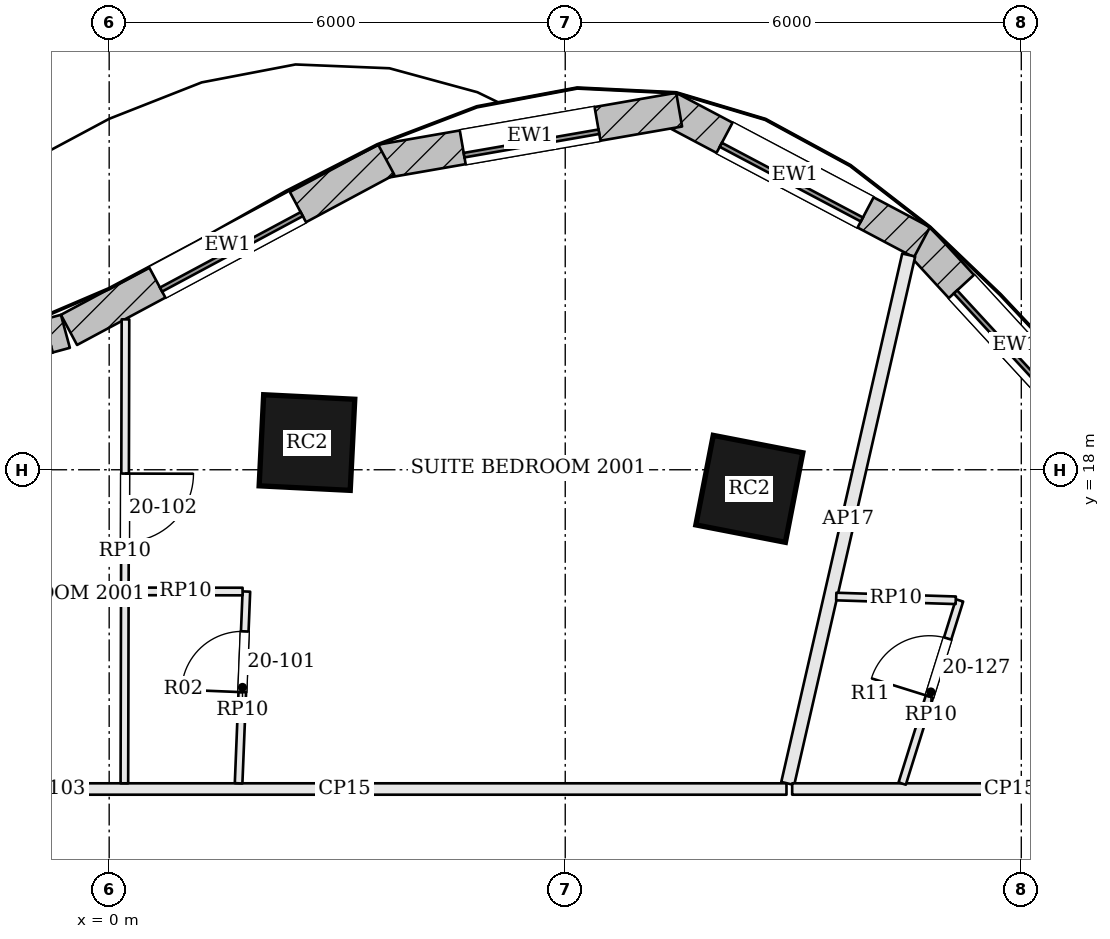
"""IFC4 building model, lengths in metres.
Left out: names, types, materials, properties, quantities, classifications, styles, units other than length and angle.
Written with IfcOpenShell. Run it as: python <this file> out.ifc"""

import sys

from ifc_helpers import new_model, si_unit, direction, frame, frame_2d, origin, origin_2d, place, context, subcontext, project, spatial, rectangle, extrude, element, fill, save


model = new_model("IFC4")
c1 = context("Model", 3, precision=1e-05, world=origin(), true_north=direction((0.0, 1.0)))
c2 = subcontext(c1, "Body", "Model", "MODEL_VIEW")
j1 = project(units=[si_unit("LENGTHUNIT", "METRE"), si_unit("PLANEANGLEUNIT", "RADIAN")], contexts=[c1])
p1 = place(None, origin())
s1 = spatial("IfcSite", under=j1, at=p1, CompositionType="ELEMENT")
p2 = place(p1, origin())
s2 = spatial("IfcBuilding", under=s1, at=p2, CompositionType="ELEMENT")
p3 = place(p2, frame((0.0, 0.0, 88.8)))
s3 = spatial("IfcBuildingStorey", under=s2, at=p3, CompositionType="ELEMENT", Elevation=88.8)
for number, where, z_axis, x_axis in (
    (1, (8.422, 17.749, 0.0), (0.0, 0.0, 1.0), (-0.982, 0.191, 0.0)),
    (2, (2.602, 18.358, 0.0), (0.0, 0.0, 1.0), (-0.999, 0.05, 0.0)),
):
    element("IfcColumn", number, at=place(p3, frame(where, z_axis=z_axis, x_axis=x_axis)), inside=s3, PredefinedType="COLUMN", context=c2, shape_type="SweptSolid", body=[
        extrude(rectangle(XDim=1.2, YDim=1.2, at=origin_2d()), origin(), (0.0, 0.0, 1.0), 3.6),
    ])
p4 = place(p3, frame((13.209, 18.243, 0.0), z_axis=(0.0, 0.0, 1.0), x_axis=(-0.677612152497, 0.735419452278, 0.0)))
e3 = element("IfcWall", 3, at=p4, inside=s3, PredefinedType="SOLIDWALL", context=c2, shape_type="SweptSolid", body=[
    extrude(rectangle(XDim=3.797, YDim=0.45, at=frame_2d((1.898, 0.0))), origin(), (0.0, 0.0, 1.0), 3.4),
])
p5 = place(p4, frame((0.848, 0.0, 0.9)))
e4 = element("IfcOpeningElement", 4, at=p5, cuts=e3, PredefinedType="OPENING", context=c2, shape_type="SweptSolid", body=[
    extrude(rectangle(XDim=2.1, YDim=2.0, at=frame_2d((1.05, 1.0))), frame((0.0, 0.235, 0.0), z_axis=(0.0, -1.0, 0.0), x_axis=(1.0, 0.0, 0.0)), (0.0, 0.0, 1.0), 0.47),
])
p6 = place(p3, frame((10.693, 20.993, 0.0), z_axis=(0.0, 0.0, 1.0), x_axis=(-0.883817790726, 0.46783128668, 0.0)))
e5 = element("IfcWall", 5, at=p6, inside=s3, PredefinedType="SOLIDWALL", context=c2, shape_type="SweptSolid", body=[
    extrude(rectangle(XDim=3.777, YDim=0.45, at=frame_2d((1.888, 0.0))), origin(), (0.0, 0.0, 1.0), 3.4),
])
p7 = place(p6, frame((0.838, 0.0, 0.9)))
e6 = element("IfcOpeningElement", 6, at=p7, cuts=e5, PredefinedType="OPENING", context=c2, shape_type="SweptSolid", body=[
    extrude(rectangle(XDim=2.1, YDim=2.0, at=frame_2d((1.05, 1.0))), frame((0.0, 0.235, 0.0), z_axis=(0.0, -1.0, 0.0), x_axis=(1.0, 0.0, 0.0)), (0.0, 0.0, 1.0), 0.47),
])
p8 = place(p3, frame((7.499, 22.737, 0.0), z_axis=(0.0, 0.0, 1.0), x_axis=(-0.98521220506, -0.171338585849, 0.0)))
e7 = element("IfcWall", 7, at=p8, inside=s3, PredefinedType="SOLIDWALL", context=c2, shape_type="SweptSolid", body=[
    extrude(rectangle(XDim=3.98, YDim=0.45, at=frame_2d((1.99, 0.0))), origin(), (0.0, 0.0, 1.0), 3.4),
])
p9 = place(p8, frame((1.09, 0.0, 0.9)))
e8 = element("IfcOpeningElement", 8, at=p9, cuts=e7, PredefinedType="OPENING", context=c2, shape_type="SweptSolid", body=[
    extrude(rectangle(XDim=1.8, YDim=2.0, at=frame_2d((0.9, 1.0))), frame((0.0, 0.235, 0.0), z_axis=(0.0, -1.0, 0.0), x_axis=(1.0, 0.0, 0.0)), (0.0, 0.0, 1.0), 0.47),
])
p10 = place(p3, frame((3.646, 22.079, 0.0), z_axis=(0.0, 0.0, 1.0), x_axis=(-0.881279133897, -0.472596115259, 0.0)))
e9 = element("IfcWall", 9, at=p10, inside=s3, PredefinedType="SOLIDWALL", context=c2, shape_type="SweptSolid", body=[
    extrude(rectangle(XDim=4.737, YDim=0.45, at=frame_2d((2.368, 0.0))), origin(), (0.0, 0.0, 1.0), 3.4),
])
p11 = place(p10, frame((1.318, 0.0, 0.9)))
e10 = element("IfcOpeningElement", 10, at=p11, cuts=e9, PredefinedType="OPENING", context=c2, shape_type="SweptSolid", body=[
    extrude(rectangle(XDim=2.1, YDim=2.0, at=frame_2d((1.05, 1.0))), frame((0.0, 0.235, 0.0), z_axis=(0.0, -1.0, 0.0), x_axis=(1.0, 0.0, 0.0)), (0.0, 0.0, 1.0), 0.47),
])
p12 = place(p3, frame((-0.576, 19.821, 0.0), z_axis=(0.0, 0.0, 1.0), x_axis=(-0.965009398019, -0.262215296532, 0.0)))
e11 = element("IfcWall", 11, at=p12, inside=s3, PredefinedType="SOLIDWALL", context=c2, shape_type="SweptSolid", body=[
    extrude(rectangle(XDim=2.565, YDim=0.45, at=frame_2d((1.283, 0.0))), origin(), (0.0, 0.0, 1.0), 3.4),
])
p13 = place(p12, frame((0.233, 0.0, 0.9)))
e12 = element("IfcOpeningElement", 12, at=p13, cuts=e11, PredefinedType="OPENING", context=c2, shape_type="SweptSolid", body=[
    extrude(rectangle(XDim=2.1, YDim=2.0, at=frame_2d((1.05, 1.0))), frame((0.0, 0.235, 0.0), z_axis=(0.0, -1.0, 0.0), x_axis=(1.0, 0.0, 0.0)), (0.0, 0.0, 1.0), 0.47),
])
p14 = place(p3, frame((8.911, 13.8, 0.0), z_axis=(0.0, 0.0, 1.0), x_axis=(-1.0, 0.0, 0.0)))
e13 = element("IfcWall", 13, at=p14, inside=s3, PredefinedType="PARTITIONING", context=c2, shape_type="SweptSolid", body=[
    extrude(rectangle(XDim=11.628, YDim=0.15, at=frame_2d((5.814, 0.0))), origin(), (0.0, 0.0, 1.0), 2.784),
])
p15 = place(p14, frame((9.669, 0.0, 0.0)))
e14 = element("IfcOpeningElement", 14, at=p15, cuts=e13, PredefinedType="OPENING", context=c2, shape_type="SweptSolid", body=[
    extrude(rectangle(XDim=1.0, YDim=2.1, at=frame_2d((0.5, 1.05))), frame((0.0, 0.085, 0.0), z_axis=(0.0, -1.0, 0.0), x_axis=(1.0, 0.0, 0.0)), (0.0, 0.0, 1.0), 0.17),
])
p16 = place(p3, frame((10.519, 20.825, 0.0), z_axis=(0.0, 0.0, 1.0), x_axis=(-0.223124088509, -0.974790049768, 0.0)))
e15 = element("IfcWall", 15, at=p16, inside=s3, PredefinedType="PARTITIONING", context=c2, shape_type="SweptSolid", body=[
    extrude(rectangle(XDim=7.132, YDim=0.175, at=frame_2d((3.566, 0.0))), origin(), (0.0, 0.0, 1.0), 2.784),
])
p17 = place(p3, frame((14.725, 13.8, 0.0), z_axis=(0.0, 0.0, 1.0), x_axis=(-1.0, 0.0, 0.0)))
e16 = element("IfcWall", 16, at=p17, inside=s3, PredefinedType="PARTITIONING", context=c2, shape_type="SweptSolid", body=[
    extrude(rectangle(XDim=5.74, YDim=0.15, at=frame_2d((2.87, 0.0))), origin(), (0.0, 0.0, 1.0), 2.784),
])
p18 = place(p3, frame((0.214, 19.979, 0.0), z_axis=(0.0, 0.0, 1.0), x_axis=(-0.002359899032, -0.999997215434, 0.0)))
e17 = element("IfcWall", 17, at=p18, inside=s3, PredefinedType="PARTITIONING", context=c2, shape_type="SweptSolid", body=[
    extrude(rectangle(XDim=6.104, YDim=0.1, at=frame_2d((3.052, 0.0))), origin(), (0.0, 0.0, 1.0), 2.884),
])
p19 = place(p18, frame((2.029, 0.0, 0.0)))
e18 = element("IfcOpeningElement", 18, at=p19, cuts=e17, PredefinedType="OPENING", context=c2, shape_type="SweptSolid", body=[
    extrude(rectangle(XDim=0.9, YDim=2.4, at=frame_2d((0.45, 1.2))), frame((0.0, 0.06, 0.0), z_axis=(0.0, -1.0, 0.0), x_axis=(1.0, 0.0, 0.0)), (0.0, 0.0, 1.0), 0.12),
])
p20 = place(p3, frame((1.703, 13.875, 0.0), z_axis=(0.0, 0.0, 1.0), x_axis=(0.040512484472, 0.999179032307, 0.0)))
e19 = element("IfcWall", 19, at=p20, inside=s3, PredefinedType="PARTITIONING", context=c2, shape_type="SweptSolid", body=[
    extrude(rectangle(XDim=2.525, YDim=0.1, at=frame_2d((1.262, 0.0))), origin(), (0.0, 0.0, 1.0), 2.884),
])
p21 = place(p20, frame((1.2, 0.0, 0.0)))
e20 = element("IfcOpeningElement", 20, at=p21, cuts=e19, PredefinedType="OPENING", context=c2, shape_type="SweptSolid", body=[
    extrude(rectangle(XDim=0.8, YDim=2.1, at=frame_2d((0.4, 1.05))), frame((0.0, 0.06, 0.0), z_axis=(0.0, -1.0, 0.0), x_axis=(1.0, 0.0, 0.0)), (0.0, 0.0, 1.0), 0.12),
])
p22 = place(p3, frame((1.755, 16.398, 0.0), z_axis=(0.0, 0.0, 1.0), x_axis=(-0.999999151462, 0.001302718321, 0.0)))
e21 = element("IfcWall", 21, at=p22, inside=s3, PredefinedType="PARTITIONING", context=c2, shape_type="SweptSolid", body=[
    extrude(rectangle(XDim=1.499, YDim=0.1, at=frame_2d((0.75, 0.0))), origin(), (0.0, 0.0, 1.0), 2.884),
])
p23 = place(p3, frame((10.433, 13.872, 0.0), z_axis=(0.0, 0.0, 1.0), x_axis=(0.298770443437, 0.954325008647, 0.0)))
e22 = element("IfcWall", 22, at=p23, inside=s3, PredefinedType="PARTITIONING", context=c2, shape_type="SweptSolid", body=[
    extrude(rectangle(XDim=2.525, YDim=0.1, at=frame_2d((1.262, 0.0))), origin(), (0.0, 0.0, 1.0), 2.884),
])
p24 = place(p23, frame((1.2, 0.0, 0.0)))
e23 = element("IfcOpeningElement", 23, at=p24, cuts=e22, PredefinedType="OPENING", context=c2, shape_type="SweptSolid", body=[
    extrude(rectangle(XDim=0.8, YDim=2.1, at=frame_2d((0.4, 1.05))), frame((0.0, 0.06, 0.0), z_axis=(0.0, -1.0, 0.0), x_axis=(1.0, 0.0, 0.0)), (0.0, 0.0, 1.0), 0.12),
])
p25 = place(p3, frame((11.138, 16.283, 0.0), z_axis=(0.0, 0.0, 1.0), x_axis=(-0.99950813006, 0.031360770779, 0.0)))
e24 = element("IfcWall", 24, at=p25, inside=s3, PredefinedType="PARTITIONING", context=c2, shape_type="SweptSolid", body=[
    extrude(rectangle(XDim=1.573, YDim=0.1, at=frame_2d((0.786, 0.0))), origin(), (0.0, 0.0, 1.0), 2.884),
])
p26 = place(p5, origin())
e25 = element("IfcWindow", 25, at=p26, inside=s3, PartitioningType="SINGLE_PANEL", PredefinedType="WINDOW", context=c2, shape_type="SweptSolid", body=[
    extrude(rectangle(XDim=2.1, YDim=2.0, at=frame_2d((1.05, 1.0))), frame((0.0, 0.135, 0.0), z_axis=(0.0, -1.0, 0.0), x_axis=(1.0, 0.0, 0.0)), (0.0, 0.0, 1.0), 0.06),
])
fill(e4, e25)
p27 = place(p7, origin())
e26 = element("IfcWindow", 26, at=p27, inside=s3, PartitioningType="SINGLE_PANEL", PredefinedType="WINDOW", context=c2, shape_type="SweptSolid", body=[
    extrude(rectangle(XDim=2.1, YDim=2.0, at=frame_2d((1.05, 1.0))), frame((0.0, 0.135, 0.0), z_axis=(0.0, -1.0, 0.0), x_axis=(1.0, 0.0, 0.0)), (0.0, 0.0, 1.0), 0.06),
])
fill(e6, e26)
p28 = place(p9, origin())
e27 = element("IfcWindow", 27, at=p28, inside=s3, PartitioningType="SINGLE_PANEL", PredefinedType="WINDOW", context=c2, shape_type="SweptSolid", body=[
    extrude(rectangle(XDim=1.8, YDim=2.0, at=frame_2d((0.9, 1.0))), frame((0.0, 0.135, 0.0), z_axis=(0.0, -1.0, 0.0), x_axis=(1.0, 0.0, 0.0)), (0.0, 0.0, 1.0), 0.06),
])
fill(e8, e27)
p29 = place(p11, origin())
e28 = element("IfcWindow", 28, at=p29, inside=s3, PartitioningType="SINGLE_PANEL", PredefinedType="WINDOW", context=c2, shape_type="SweptSolid", body=[
    extrude(rectangle(XDim=2.1, YDim=2.0, at=frame_2d((1.05, 1.0))), frame((0.0, 0.135, 0.0), z_axis=(0.0, -1.0, 0.0), x_axis=(1.0, 0.0, 0.0)), (0.0, 0.0, 1.0), 0.06),
])
fill(e10, e28)
p30 = place(p21, origin())
e29 = element("IfcDoor", 29, at=p30, inside=s3, OperationType="SINGLE_SWING_LEFT", PredefinedType="DOOR", context=c2, shape_type="SweptSolid", body=[
    extrude(rectangle(XDim=0.8, YDim=2.1, at=frame_2d((0.4, 1.05))), frame((0.0, 0.025, 0.0), z_axis=(0.0, -1.0, 0.0), x_axis=(1.0, 0.0, 0.0)), (0.0, 0.0, 1.0), 0.05),
])
fill(e20, e29)
p31 = place(p19, origin())
e30 = element("IfcDoor", 30, at=p31, inside=s3, OperationType="SINGLE_SWING_LEFT", PredefinedType="DOOR", context=c2, shape_type="SweptSolid", body=[
    extrude(rectangle(XDim=0.9, YDim=2.4, at=frame_2d((0.45, 1.2))), frame((0.0, 0.025, 0.0), z_axis=(0.0, -1.0, 0.0), x_axis=(1.0, 0.0, 0.0)), (0.0, 0.0, 1.0), 0.05),
])
fill(e18, e30)
p32 = place(p24, origin())
e31 = element("IfcDoor", 31, at=p32, inside=s3, OperationType="SINGLE_SWING_LEFT", PredefinedType="DOOR", context=c2, shape_type="SweptSolid", body=[
    extrude(rectangle(XDim=0.8, YDim=2.1, at=frame_2d((0.4, 1.05))), frame((0.0, 0.025, 0.0), z_axis=(0.0, -1.0, 0.0), x_axis=(1.0, 0.0, 0.0)), (0.0, 0.0, 1.0), 0.05),
])
fill(e23, e31)
save(model, sys.argv[1])
